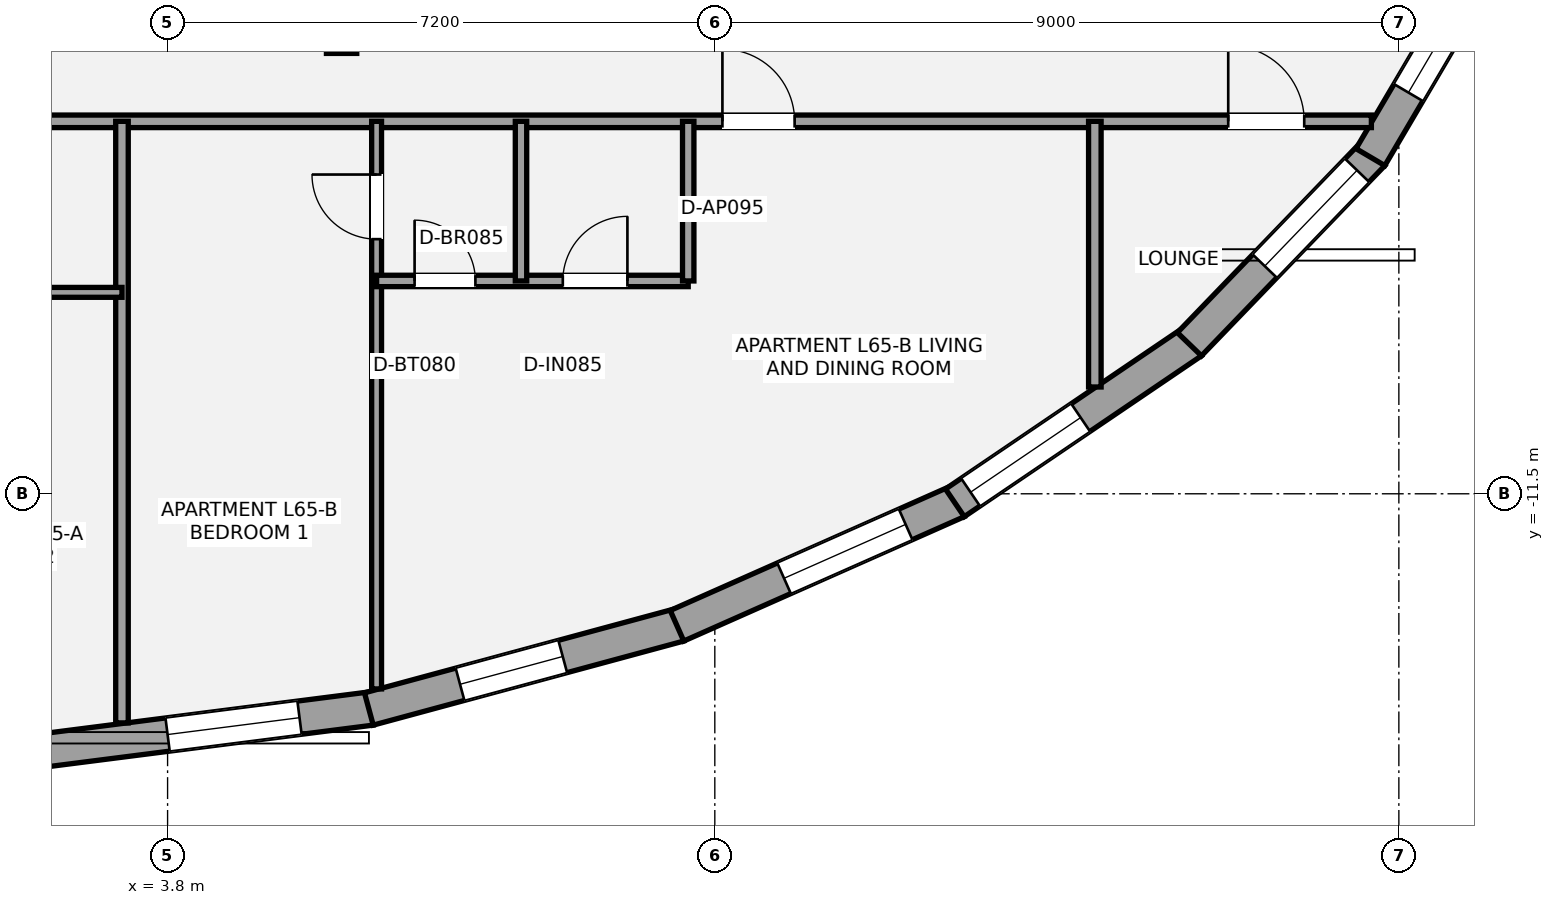
"""IFC4 building model, lengths in metres.
Left out: names, types, materials, properties, quantities, classifications, styles, units other than length and angle.
Written with IfcOpenShell. Run it as: python <this file> out.ifc"""

import sys

from ifc_helpers import new_model, si_unit, direction, frame, frame_2d, origin, origin_2d, place, context, subcontext, project, spatial, rectangle, i_section, extrude, element, fill, save


model = new_model("IFC4")
c1 = context("Model", 3, precision=1e-05, world=origin(), true_north=direction((0.0, 1.0)))
c2 = subcontext(c1, "Body", "Model", "MODEL_VIEW")
j1 = project(units=[si_unit("LENGTHUNIT", "METRE"), si_unit("PLANEANGLEUNIT", "RADIAN")], contexts=[c1])
p1 = place(None, origin())
s1 = spatial("IfcSite", under=j1, at=p1, CompositionType="ELEMENT")
p2 = place(p1, origin())
s2 = spatial("IfcBuilding", under=s1, at=p2, CompositionType="ELEMENT")
p3 = place(p2, frame((0.0, 0.0, 232.05)))
s3 = spatial("IfcBuildingStorey", under=s2, at=p3, CompositionType="ELEMENT", Elevation=232.05)
p4 = place(p3, frame((6.09, -5.513, 0.0), z_axis=(0.0, 0.0, 1.0), x_axis=(1.0, 0.0, 0.0)))
e1 = element("IfcColumn", 1, at=p4, inside=s3, PredefinedType="COLUMN", context=c2, shape_type="SweptSolid", body=[
    extrude(i_section(OverallWidth=0.399, OverallDepth=0.387, WebThickness=0.021, FlangeThickness=0.033, at=origin_2d()), origin(), (0.0, 0.0, 1.0), 3.15),
])
p5 = place(p3, frame((6.478, -14.325, 0.0), z_axis=(0.0, 0.0, 1.0), x_axis=(-0.991932064275, -0.126770579643, 0.0)))
e2 = element("IfcWall", 2, at=p5, inside=s3, PredefinedType="STANDARD", context=c2, shape_type="SweptSolid", body=[
    extrude(rectangle(XDim=4.349, YDim=0.44, at=frame_2d((2.174, 0.0))), origin(), (0.0, 0.0, 1.0), 2.336),
])
p6 = place(p5, frame((0.949, 0.0, 0.55)))
e3 = element("IfcOpeningElement", 3, at=p6, cuts=e2, PredefinedType="OPENING", context=c2, shape_type="SweptSolid", body=[
    extrude(rectangle(XDim=1.75, YDim=1.55, at=frame_2d((0.875, 0.775))), frame((0.0, 0.23, 0.0), z_axis=(0.0, -1.0, 0.0), x_axis=(1.0, 0.0, 0.0)), (0.0, 0.0, 1.0), 0.46),
])
p7 = place(p3, frame((10.534, -13.225, 0.0), z_axis=(0.0, 0.0, 1.0), x_axis=(-0.965250622562, -0.261325918429, 0.0)))
e4 = element("IfcWall", 4, at=p7, inside=s3, PredefinedType="STANDARD", context=c2, shape_type="SweptSolid", body=[
    extrude(rectangle(XDim=4.233, YDim=0.44, at=frame_2d((2.117, 0.0))), origin(), (0.0, 0.0, 1.0), 2.336),
])
p8 = place(p7, frame((1.59, 0.0, 0.55)))
e5 = element("IfcOpeningElement", 5, at=p8, cuts=e4, PredefinedType="OPENING", context=c2, shape_type="SweptSolid", body=[
    extrude(rectangle(XDim=1.4, YDim=1.55, at=frame_2d((0.7, 0.775))), frame((0.0, 0.23, 0.0), z_axis=(0.0, -1.0, 0.0), x_axis=(1.0, 0.0, 0.0)), (0.0, 0.0, 1.0), 0.46),
])
p9 = place(p3, frame((14.193, -11.6, 0.0), z_axis=(0.0, 0.0, 1.0), x_axis=(-0.914197700285, -0.405268509501, 0.0)))
e6 = element("IfcWall", 6, at=p9, inside=s3, PredefinedType="STANDARD", context=c2, shape_type="SweptSolid", body=[
    extrude(rectangle(XDim=4.037, YDim=0.44, at=frame_2d((2.019, 0.0))), origin(), (0.0, 0.0, 1.0), 2.336),
])
p10 = place(p9, frame((0.746, 0.0, 0.55)))
e7 = element("IfcOpeningElement", 7, at=p10, cuts=e6, PredefinedType="OPENING", context=c2, shape_type="SweptSolid", body=[
    extrude(rectangle(XDim=1.75, YDim=1.55, at=frame_2d((0.875, 0.775))), frame((0.0, 0.23, 0.0), z_axis=(0.0, -1.0, 0.0), x_axis=(1.0, 0.0, 0.0)), (0.0, 0.0, 1.0), 0.46),
])
p11 = place(p3, frame((17.279, -9.503, 0.0), z_axis=(0.0, 0.0, 1.0), x_axis=(-0.827641205742, -0.56125754744, 0.0)))
e8 = element("IfcWall", 8, at=p11, inside=s3, PredefinedType="STANDARD", context=c2, shape_type="SweptSolid", body=[
    extrude(rectangle(XDim=3.771, YDim=0.44, at=frame_2d((1.885, 0.0))), origin(), (0.0, 0.0, 1.0), 2.336),
])
p12 = place(p11, frame((1.771, 0.0, 0.55)))
e9 = element("IfcOpeningElement", 9, at=p12, cuts=e8, PredefinedType="OPENING", context=c2, shape_type="SweptSolid", body=[
    extrude(rectangle(XDim=1.75, YDim=1.55, at=frame_2d((0.875, 0.775))), frame((0.0, 0.23, 0.0), z_axis=(0.0, -1.0, 0.0), x_axis=(1.0, 0.0, 0.0)), (0.0, 0.0, 1.0), 0.46),
])
p13 = place(p3, frame((19.657, -7.03, 0.0), z_axis=(0.0, 0.0, 1.0), x_axis=(-0.694030285144, -0.71994580581, 0.0)))
e10 = element("IfcWall", 10, at=p13, inside=s3, PredefinedType="STANDARD", context=c2, shape_type="SweptSolid", body=[
    extrude(rectangle(XDim=3.476, YDim=0.44, at=frame_2d((1.738, 0.0))), origin(), (0.0, 0.0, 1.0), 2.336),
])
p14 = place(p13, frame((0.298, 0.0, 0.55)))
e11 = element("IfcOpeningElement", 11, at=p14, cuts=e10, PredefinedType="OPENING", context=c2, shape_type="SweptSolid", body=[
    extrude(rectangle(XDim=1.75, YDim=1.55, at=frame_2d((0.875, 0.775))), frame((0.0, 0.23, 0.0), z_axis=(0.0, -1.0, 0.0), x_axis=(1.0, 0.0, 0.0)), (0.0, 0.0, 1.0), 0.46),
])
p15 = place(p3, frame((21.257, -4.3, 0.0), z_axis=(0.0, 0.0, 1.0), x_axis=(-0.507308799926, -0.861764342218, 0.0)))
e12 = element("IfcWall", 12, at=p15, inside=s3, PredefinedType="STANDARD", context=c2, shape_type="SweptSolid", body=[
    extrude(rectangle(XDim=3.215, YDim=0.44, at=frame_2d((1.607, 0.0))), origin(), (0.0, 0.0, 1.0), 2.336),
])
p16 = place(p15, frame((1.33, 0.0, 0.58)))
e13 = element("IfcOpeningElement", 13, at=p16, cuts=e12, PredefinedType="OPENING", context=c2, shape_type="SweptSolid", body=[
    extrude(rectangle(XDim=0.9, YDim=1.35, at=frame_2d((0.45, 0.675))), frame((0.0, 0.23, 0.0), z_axis=(0.0, -1.0, 0.0), x_axis=(1.0, 0.0, 0.0)), (0.0, 0.0, 1.0), 0.46),
])
p17 = place(p3, frame((-19.638, -6.6, 0.0), z_axis=(0.0, 0.0, 1.0), x_axis=(1.0, 0.0, 0.0)))
e14 = element("IfcWall", 14, at=p17, inside=s3, PredefinedType="PARTITIONING", context=c2, shape_type="SweptSolid", body=[
    extrude(rectangle(XDim=39.277, YDim=0.165, at=frame_2d((19.638, 0.0))), origin(), (0.0, 0.0, 1.0), 2.423),
])
p18 = place(p17, frame((1.229, 0.0, 0.0)))
e15 = element("IfcOpeningElement", 15, at=p18, cuts=e14, PredefinedType="OPENING", context=c2, shape_type="SweptSolid", body=[
    extrude(rectangle(XDim=1.0, YDim=2.15, at=frame_2d((0.5, 1.075))), frame((0.0, 0.093, 0.0), z_axis=(0.0, -1.0, 0.0), x_axis=(1.0, 0.0, 0.0)), (0.0, 0.0, 1.0), 0.185),
])
p19 = place(p17, frame((37.393, 0.0, 0.0)))
e16 = element("IfcOpeningElement", 16, at=p19, cuts=e14, PredefinedType="OPENING", context=c2, shape_type="SweptSolid", body=[
    extrude(rectangle(XDim=1.0, YDim=2.15, at=frame_2d((0.5, 1.075))), frame((0.0, 0.093, 0.0), z_axis=(0.0, -1.0, 0.0), x_axis=(1.0, 0.0, 0.0)), (0.0, 0.0, 1.0), 0.185),
])
p20 = place(p17, frame((13.948, 0.0, 0.0)))
e17 = element("IfcOpeningElement", 17, at=p20, cuts=e14, PredefinedType="OPENING", context=c2, shape_type="SweptSolid", body=[
    extrude(rectangle(XDim=0.95, YDim=2.15, at=frame_2d((0.475, 1.075))), frame((0.0, 0.093, 0.0), z_axis=(0.0, -1.0, 0.0), x_axis=(1.0, 0.0, 0.0)), (0.0, 0.0, 1.0), 0.185),
])
p21 = place(p17, frame((30.738, 0.0, 0.0)))
e18 = element("IfcOpeningElement", 18, at=p21, cuts=e14, PredefinedType="OPENING", context=c2, shape_type="SweptSolid", body=[
    extrude(rectangle(XDim=0.95, YDim=2.15, at=frame_2d((0.475, 1.075))), frame((0.0, 0.093, 0.0), z_axis=(0.0, -1.0, 0.0), x_axis=(1.0, 0.0, 0.0)), (0.0, 0.0, 1.0), 0.185),
])
p22 = place(p3, frame((16.0, -10.095, 0.0), z_axis=(0.0, 0.0, 1.0), x_axis=(0.0, 1.0, 0.0)))
e19 = element("IfcWall", 19, at=p22, inside=s3, PredefinedType="PARTITIONING", context=c2, shape_type="SweptSolid", body=[
    extrude(rectangle(XDim=3.495, YDim=0.165, at=frame_2d((1.748, 0.0))), origin(), (0.0, 0.0, 1.0), 2.423),
])
p23 = place(p3, frame((3.2, -14.514, 0.0), z_axis=(0.0, 0.0, 1.0), x_axis=(0.0, 1.0, 0.0)))
e20 = element("IfcWall", 20, at=p23, inside=s3, PredefinedType="PARTITIONING", context=c2, shape_type="SweptSolid", body=[
    extrude(rectangle(XDim=7.914, YDim=0.165, at=frame_2d((3.957, 0.0))), origin(), (0.0, 0.0, 1.0), 2.423),
])
p24 = place(p3, frame((-0.15, -8.85, 0.0), z_axis=(0.0, 0.0, 1.0), x_axis=(1.0, 0.0, 0.0)))
e21 = element("IfcWall", 21, at=p24, inside=s3, PredefinedType="PARTITIONING", context=c2, shape_type="SweptSolid", body=[
    extrude(rectangle(XDim=3.35, YDim=0.13, at=frame_2d((1.675, 0.0))), origin(), (0.0, 0.0, 1.0), 2.97),
])
p25 = place(p24, frame((0.8, 0.0, 0.0)))
e22 = element("IfcOpeningElement", 22, at=p25, cuts=e21, PredefinedType="OPENING", context=c2, shape_type="SweptSolid", body=[
    extrude(rectangle(XDim=0.85, YDim=2.1, at=frame_2d((0.425, 1.05))), frame((0.0, 0.075, 0.0), z_axis=(0.0, -1.0, 0.0), x_axis=(1.0, 0.0, 0.0)), (0.0, 0.0, 1.0), 0.15),
])
p26 = place(p3, frame((6.55, -14.067, 0.0), z_axis=(0.0, 0.0, 1.0), x_axis=(0.0, 1.0, 0.0)))
e23 = element("IfcWall", 23, at=p26, inside=s3, PredefinedType="PARTITIONING", context=c2, shape_type="SweptSolid", body=[
    extrude(rectangle(XDim=7.467, YDim=0.13, at=frame_2d((3.734, 0.0))), origin(), (0.0, 0.0, 1.0), 2.97),
])
p27 = place(p26, frame((5.917, 0.0, 0.0)))
e24 = element("IfcOpeningElement", 24, at=p27, cuts=e23, PredefinedType="OPENING", context=c2, shape_type="SweptSolid", body=[
    extrude(rectangle(XDim=0.85, YDim=2.1, at=frame_2d((0.425, 1.05))), frame((0.0, 0.075, 0.0), z_axis=(0.0, -1.0, 0.0), x_axis=(1.0, 0.0, 0.0)), (0.0, 0.0, 1.0), 0.15),
])
p28 = place(p3, frame((6.55, -8.7, 0.0), z_axis=(0.0, 0.0, 1.0), x_axis=(1.0, 0.0, 0.0)))
e25 = element("IfcWall", 25, at=p28, inside=s3, PredefinedType="PLUMBINGWALL", context=c2, shape_type="SweptSolid", body=[
    extrude(rectangle(XDim=4.1, YDim=0.15, at=frame_2d((2.05, 0.0))), origin(), (0.0, 0.0, 1.0), 2.423),
])
p29 = place(p28, frame((0.5, 0.0, 0.0)))
e26 = element("IfcOpeningElement", 26, at=p29, cuts=e25, PredefinedType="OPENING", context=c2, shape_type="SweptSolid", body=[
    extrude(rectangle(XDim=0.8, YDim=2.1, at=frame_2d((0.4, 1.05))), frame((0.0, 0.085, 0.0), z_axis=(0.0, -1.0, 0.0), x_axis=(1.0, 0.0, 0.0)), (0.0, 0.0, 1.0), 0.17),
])
p30 = place(p28, frame((2.45, 0.0, 0.0)))
e27 = element("IfcOpeningElement", 27, at=p30, cuts=e25, PredefinedType="OPENING", context=c2, shape_type="SweptSolid", body=[
    extrude(rectangle(XDim=0.85, YDim=2.1, at=frame_2d((0.425, 1.05))), frame((0.0, 0.085, 0.0), z_axis=(0.0, -1.0, 0.0), x_axis=(1.0, 0.0, 0.0)), (0.0, 0.0, 1.0), 0.17),
])
p31 = place(p3, frame((8.45, -8.7, 0.0), z_axis=(0.0, 0.0, 1.0), x_axis=(0.0, 1.0, 0.0)))
e28 = element("IfcWall", 28, at=p31, inside=s3, PredefinedType="PLUMBINGWALL", context=c2, shape_type="SweptSolid", body=[
    extrude(rectangle(XDim=2.1, YDim=0.15, at=frame_2d((1.05, 0.0))), origin(), (0.0, 0.0, 1.0), 2.97),
])
p32 = place(p3, frame((10.65, -8.7, 0.0), z_axis=(0.0, 0.0, 1.0), x_axis=(0.0, 1.0, 0.0)))
e29 = element("IfcWall", 29, at=p32, inside=s3, PredefinedType="PLUMBINGWALL", context=c2, shape_type="SweptSolid", body=[
    extrude(rectangle(XDim=2.1, YDim=0.15, at=frame_2d((1.05, 0.0))), origin(), (0.0, 0.0, 1.0), 2.423),
])
p33 = place(p6, origin())
e30 = element("IfcWindow", 30, at=p33, inside=s3, PartitioningType="SINGLE_PANEL", PredefinedType="WINDOW", context=c2, shape_type="SweptSolid", body=[
    extrude(rectangle(XDim=1.75, YDim=1.55, at=frame_2d((0.875, 0.775))), frame((0.0, -0.01, 0.0), z_axis=(0.0, -1.0, 0.0), x_axis=(1.0, 0.0, 0.0)), (0.0, 0.0, 1.0), 0.06),
])
fill(e3, e30)
p34 = place(p8, origin())
e31 = element("IfcWindow", 31, at=p34, inside=s3, PartitioningType="SINGLE_PANEL", PredefinedType="WINDOW", context=c2, shape_type="SweptSolid", body=[
    extrude(rectangle(XDim=1.4, YDim=1.55, at=frame_2d((0.7, 0.775))), frame((0.0, -0.01, 0.0), z_axis=(0.0, -1.0, 0.0), x_axis=(1.0, 0.0, 0.0)), (0.0, 0.0, 1.0), 0.06),
])
fill(e5, e31)
p35 = place(p10, origin())
e32 = element("IfcWindow", 32, at=p35, inside=s3, PartitioningType="SINGLE_PANEL", PredefinedType="WINDOW", context=c2, shape_type="SweptSolid", body=[
    extrude(rectangle(XDim=1.75, YDim=1.55, at=frame_2d((0.875, 0.775))), frame((0.0, -0.01, 0.0), z_axis=(0.0, -1.0, 0.0), x_axis=(1.0, 0.0, 0.0)), (0.0, 0.0, 1.0), 0.06),
])
fill(e7, e32)
p36 = place(p12, origin())
e33 = element("IfcWindow", 33, at=p36, inside=s3, PartitioningType="SINGLE_PANEL", PredefinedType="WINDOW", context=c2, shape_type="SweptSolid", body=[
    extrude(rectangle(XDim=1.75, YDim=1.55, at=frame_2d((0.875, 0.775))), frame((0.0, -0.01, 0.0), z_axis=(0.0, -1.0, 0.0), x_axis=(1.0, 0.0, 0.0)), (0.0, 0.0, 1.0), 0.06),
])
fill(e9, e33)
p37 = place(p14, origin())
e34 = element("IfcWindow", 34, at=p37, inside=s3, PartitioningType="SINGLE_PANEL", PredefinedType="WINDOW", context=c2, shape_type="SweptSolid", body=[
    extrude(rectangle(XDim=1.75, YDim=1.55, at=frame_2d((0.875, 0.775))), frame((0.0, -0.01, 0.0), z_axis=(0.0, -1.0, 0.0), x_axis=(1.0, 0.0, 0.0)), (0.0, 0.0, 1.0), 0.06),
])
fill(e11, e34)
p38 = place(p16, origin())
e35 = element("IfcWindow", 35, at=p38, inside=s3, PartitioningType="SINGLE_PANEL", PredefinedType="WINDOW", context=c2, shape_type="SweptSolid", body=[
    extrude(rectangle(XDim=0.9, YDim=1.35, at=frame_2d((0.45, 0.675))), frame((0.0, -0.01, 0.0), z_axis=(0.0, -1.0, 0.0), x_axis=(1.0, 0.0, 0.0)), (0.0, 0.0, 1.0), 0.06),
])
fill(e13, e35)
p39 = place(p19, origin())
e36 = element("IfcDoor", 36, at=p39, inside=s3, OperationType="SINGLE_SWING_LEFT", PredefinedType="DOOR", context=c2, shape_type="SweptSolid", body=[
    extrude(rectangle(XDim=1.0, YDim=2.15, at=frame_2d((0.5, 1.075))), frame((0.0, 0.025, 0.0), z_axis=(0.0, -1.0, 0.0), x_axis=(1.0, 0.0, 0.0)), (0.0, 0.0, 1.0), 0.05),
])
fill(e16, e36)
p40 = place(p27, origin())
e37 = element("IfcDoor", 37, at=p40, inside=s3, OperationType="SINGLE_SWING_RIGHT", PredefinedType="DOOR", context=c2, shape_type="SweptSolid", body=[
    extrude(rectangle(XDim=0.85, YDim=2.1, at=frame_2d((0.425, 1.05))), frame((0.0, 0.025, 0.0), z_axis=(0.0, -1.0, 0.0), x_axis=(1.0, 0.0, 0.0)), (0.0, 0.0, 1.0), 0.05),
])
fill(e24, e37)
p41 = place(p29, origin())
e38 = element("IfcDoor", 38, at=p41, inside=s3, OperationType="SINGLE_SWING_LEFT", PredefinedType="DOOR", context=c2, shape_type="SweptSolid", body=[
    extrude(rectangle(XDim=0.8, YDim=2.1, at=frame_2d((0.4, 1.05))), frame((0.0, 0.025, 0.0), z_axis=(0.0, -1.0, 0.0), x_axis=(1.0, 0.0, 0.0)), (0.0, 0.0, 1.0), 0.05),
])
fill(e26, e38)
p42 = place(p30, origin())
e39 = element("IfcDoor", 39, at=p42, inside=s3, OperationType="SINGLE_SWING_RIGHT", PredefinedType="DOOR", context=c2, shape_type="SweptSolid", body=[
    extrude(rectangle(XDim=0.85, YDim=2.1, at=frame_2d((0.425, 1.05))), frame((0.0, 0.025, 0.0), z_axis=(0.0, -1.0, 0.0), x_axis=(1.0, 0.0, 0.0)), (0.0, 0.0, 1.0), 0.05),
])
fill(e27, e39)
p43 = place(p21, origin())
e40 = element("IfcDoor", 40, at=p43, inside=s3, OperationType="SINGLE_SWING_LEFT", PredefinedType="DOOR", context=c2, shape_type="SweptSolid", body=[
    extrude(rectangle(XDim=0.95, YDim=2.15, at=frame_2d((0.475, 1.075))), frame((0.0, 0.025, 0.0), z_axis=(0.0, -1.0, 0.0), x_axis=(1.0, 0.0, 0.0)), (0.0, 0.0, 1.0), 0.05),
])
fill(e18, e40)
save(model, sys.argv[1])
